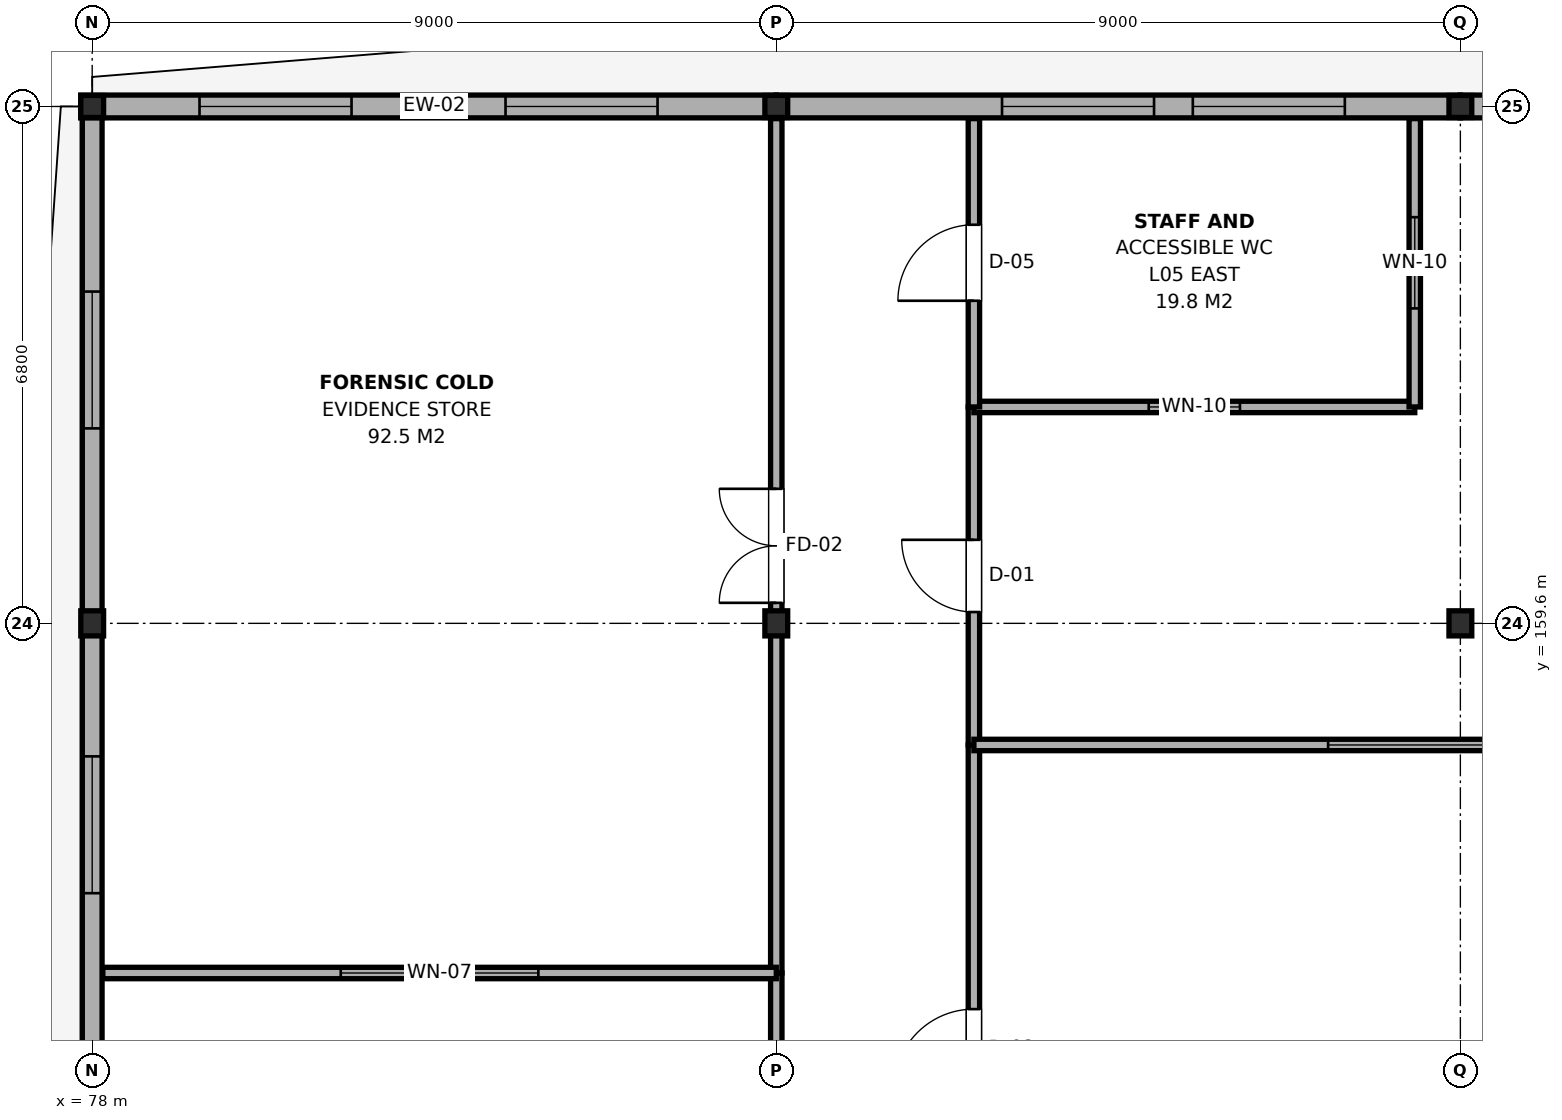
"""IFC4 building model, lengths in metres.
Left out: names, types, materials, properties, quantities, classifications, styles, units other than length and angle.
Written with IfcOpenShell. Run it as: python <this file> out.ifc"""

import sys

from ifc_helpers import new_model, si_unit, direction, frame, frame_2d, origin, origin_2d, place, context, subcontext, project, spatial, rectangle, i_section, extrude, element, fill, save


model = new_model("IFC4")
c1 = context("Model", 3, precision=1e-05, world=origin(), true_north=direction((0.0, 1.0)))
c2 = subcontext(c1, "Body", "Model", "MODEL_VIEW")
j1 = project(units=[si_unit("LENGTHUNIT", "METRE"), si_unit("PLANEANGLEUNIT", "RADIAN")], contexts=[c1])
p1 = place(None, origin())
s1 = spatial("IfcSite", under=j1, at=p1, CompositionType="ELEMENT")
p2 = place(p1, origin())
s2 = spatial("IfcBuilding", under=s1, at=p2, CompositionType="ELEMENT")
p3 = place(p2, frame((0.0, 0.0, 21.0)))
s3 = spatial("IfcBuildingStorey", under=s2, at=p3, CompositionType="ELEMENT", Elevation=21.0)
p4 = place(p3, frame((78.0, 159.6, 0.0), z_axis=(0.0, 0.0, 1.0), x_axis=(1.0, 0.0, 0.0)))
e1 = element("IfcColumn", 1, at=p4, inside=s3, PredefinedType="COLUMN", context=c2, shape_type="SweptSolid", body=[
    extrude(i_section(OverallWidth=0.3, OverallDepth=0.33, WebThickness=0.01, FlangeThickness=0.017, FilletRadius=0.027, at=origin_2d()), origin(), (0.0, 0.0, 1.0), 3.7),
])
p5 = place(p3, frame((78.0, 166.4, 0.0), z_axis=(0.0, 0.0, 1.0), x_axis=(1.0, 0.0, 0.0)))
e2 = element("IfcColumn", 2, at=p5, inside=s3, PredefinedType="COLUMN", context=c2, shape_type="SweptSolid", body=[
    extrude(i_section(OverallWidth=0.3, OverallDepth=0.29, WebThickness=0.009, FlangeThickness=0.014, FilletRadius=0.027, at=origin_2d()), origin(), (0.0, 0.0, 1.0), 3.7),
])
p6 = place(p3, frame((87.0, 159.6, 0.0), z_axis=(0.0, 0.0, 1.0), x_axis=(1.0, 0.0, 0.0)))
e3 = element("IfcColumn", 3, at=p6, inside=s3, PredefinedType="COLUMN", context=c2, shape_type="SweptSolid", body=[
    extrude(i_section(OverallWidth=0.3, OverallDepth=0.33, WebThickness=0.01, FlangeThickness=0.017, FilletRadius=0.027, at=origin_2d()), origin(), (0.0, 0.0, 1.0), 3.7),
])
p7 = place(p3, frame((87.0, 166.4, 0.0), z_axis=(0.0, 0.0, 1.0), x_axis=(1.0, 0.0, 0.0)))
e4 = element("IfcColumn", 4, at=p7, inside=s3, PredefinedType="COLUMN", context=c2, shape_type="SweptSolid", body=[
    extrude(i_section(OverallWidth=0.3, OverallDepth=0.29, WebThickness=0.009, FlangeThickness=0.014, FilletRadius=0.027, at=origin_2d()), origin(), (0.0, 0.0, 1.0), 3.7),
])
p8 = place(p3, frame((96.0, 159.6, 0.0), z_axis=(0.0, 0.0, 1.0), x_axis=(1.0, 0.0, 0.0)))
e5 = element("IfcColumn", 5, at=p8, inside=s3, PredefinedType="COLUMN", context=c2, shape_type="SweptSolid", body=[
    extrude(i_section(OverallWidth=0.3, OverallDepth=0.33, WebThickness=0.01, FlangeThickness=0.017, FilletRadius=0.027, at=origin_2d()), origin(), (0.0, 0.0, 1.0), 3.7),
])
p9 = place(p3, frame((96.0, 166.4, 0.0), z_axis=(0.0, 0.0, 1.0), x_axis=(1.0, 0.0, 0.0)))
e6 = element("IfcColumn", 6, at=p9, inside=s3, PredefinedType="COLUMN", context=c2, shape_type="SweptSolid", body=[
    extrude(i_section(OverallWidth=0.3, OverallDepth=0.29, WebThickness=0.009, FlangeThickness=0.014, FilletRadius=0.027, at=origin_2d()), origin(), (0.0, 0.0, 1.0), 3.7),
])
p10 = place(p3, frame((78.0, 152.4, 0.0), z_axis=(0.0, 0.0, 1.0), x_axis=(0.0, 1.0, 0.0)))
e7 = element("IfcWall", 7, at=p10, inside=s3, PredefinedType="SOLIDWALL", context=c2, shape_type="SweptSolid", body=[
    extrude(rectangle(XDim=7.2, YDim=0.26, at=frame_2d((3.6, 0.0))), origin(), (0.0, 0.0, 1.0), 3.095),
])
p11 = place(p10, frame((3.65, 0.0, 0.65)))
e8 = element("IfcOpeningElement", 8, at=p11, cuts=e7, PredefinedType="OPENING", context=c2, shape_type="SweptSolid", body=[
    extrude(rectangle(XDim=1.8, YDim=1.2, at=frame_2d((0.9, 0.6))), frame((0.0, 0.145, 0.0), z_axis=(0.0, -1.0, 0.0), x_axis=(1.0, 0.0, 0.0)), (0.0, 0.0, 1.0), 0.29),
])
p12 = place(p3, frame((78.0, 159.6, 0.0), z_axis=(0.0, 0.0, 1.0), x_axis=(0.0, 1.0, 0.0)))
e9 = element("IfcWall", 9, at=p12, inside=s3, PredefinedType="SOLIDWALL", context=c2, shape_type="SweptSolid", body=[
    extrude(rectangle(XDim=6.93, YDim=0.26, at=frame_2d((3.465, 0.0))), origin(), (0.0, 0.0, 1.0), 3.095),
])
p13 = place(p12, frame((2.565, 0.0, 0.65)))
e10 = element("IfcOpeningElement", 10, at=p13, cuts=e9, PredefinedType="OPENING", context=c2, shape_type="SweptSolid", body=[
    extrude(rectangle(XDim=1.8, YDim=1.2, at=frame_2d((0.9, 0.6))), frame((0.0, 0.145, 0.0), z_axis=(0.0, -1.0, 0.0), x_axis=(1.0, 0.0, 0.0)), (0.0, 0.0, 1.0), 0.29),
])
p14 = place(p3, frame((77.85, 166.4, 0.0), z_axis=(0.0, 0.0, 1.0), x_axis=(1.0, 0.0, 0.0)))
e11 = element("IfcWall", 11, at=p14, inside=s3, PredefinedType="SOLIDWALL", context=c2, shape_type="SweptSolid", body=[
    extrude(rectangle(XDim=9.15, YDim=0.3, at=frame_2d((4.575, 0.0))), origin(), (0.0, 0.0, 1.0), 3.155),
])
p15 = place(p14, frame((1.562, 0.0, 0.65)))
e12 = element("IfcOpeningElement", 12, at=p15, cuts=e11, PredefinedType="OPENING", context=c2, shape_type="SweptSolid", body=[
    extrude(rectangle(XDim=2.0, YDim=1.8, at=frame_2d((1.0, 0.9))), frame((0.0, 0.165, 0.0), z_axis=(0.0, -1.0, 0.0), x_axis=(1.0, 0.0, 0.0)), (0.0, 0.0, 1.0), 0.33),
])
p16 = place(p14, frame((5.588, 0.0, 0.65)))
e13 = element("IfcOpeningElement", 13, at=p16, cuts=e11, PredefinedType="OPENING", context=c2, shape_type="SweptSolid", body=[
    extrude(rectangle(XDim=2.0, YDim=1.8, at=frame_2d((1.0, 0.9))), frame((0.0, 0.165, 0.0), z_axis=(0.0, -1.0, 0.0), x_axis=(1.0, 0.0, 0.0)), (0.0, 0.0, 1.0), 0.33),
])
p17 = place(p3, frame((87.0, 166.4, 0.0), z_axis=(0.0, 0.0, 1.0), x_axis=(1.0, 0.0, 0.0)))
e14 = element("IfcWall", 14, at=p17, inside=s3, PredefinedType="SOLIDWALL", context=c2, shape_type="SweptSolid", body=[
    extrude(rectangle(XDim=9.0, YDim=0.3, at=frame_2d((4.5, 0.0))), origin(), (0.0, 0.0, 1.0), 3.155),
])
p18 = place(p17, frame((2.97, 0.0, 0.65)))
e15 = element("IfcOpeningElement", 15, at=p18, cuts=e14, PredefinedType="OPENING", context=c2, shape_type="SweptSolid", body=[
    extrude(rectangle(XDim=2.0, YDim=1.8, at=frame_2d((1.0, 0.9))), frame((0.0, 0.165, 0.0), z_axis=(0.0, -1.0, 0.0), x_axis=(1.0, 0.0, 0.0)), (0.0, 0.0, 1.0), 0.33),
])
p19 = place(p17, frame((5.48, 0.0, 0.65)))
e16 = element("IfcOpeningElement", 16, at=p19, cuts=e14, PredefinedType="OPENING", context=c2, shape_type="SweptSolid", body=[
    extrude(rectangle(XDim=2.0, YDim=1.8, at=frame_2d((1.0, 0.9))), frame((0.0, 0.165, 0.0), z_axis=(0.0, -1.0, 0.0), x_axis=(1.0, 0.0, 0.0)), (0.0, 0.0, 1.0), 0.33),
])
p20 = place(p3, frame((96.0, 166.4, 0.0), z_axis=(0.0, 0.0, 1.0), x_axis=(1.0, 0.0, 0.0)))
e17 = element("IfcWall", 17, at=p20, inside=s3, PredefinedType="SOLIDWALL", context=c2, shape_type="SweptSolid", body=[
    extrude(rectangle(XDim=9.0, YDim=0.3, at=frame_2d((4.5, 0.0))), origin(), (0.0, 0.0, 1.0), 3.205),
])
p21 = place(p3, frame((87.0, 144.2, 0.0), z_axis=(0.0, 0.0, 1.0), x_axis=(0.0, 1.0, 0.0)))
e18 = element("IfcWall", 18, at=p21, inside=s3, PredefinedType="PARTITIONING", context=c2, shape_type="SweptSolid", body=[
    extrude(rectangle(XDim=10.8, YDim=0.15, at=frame_2d((5.4, 0.0))), origin(), (0.0, 0.0, 1.0), 3.105),
])
p22 = place(p21, frame((4.875, 0.0, 0.0)))
e19 = element("IfcOpeningElement", 19, at=p22, cuts=e18, PredefinedType="OPENING", context=c2, shape_type="SweptSolid", body=[
    extrude(rectangle(XDim=1.05, YDim=2.15, at=frame_2d((0.525, 1.075))), frame((0.0, 0.09, 0.0), z_axis=(0.0, -1.0, 0.0), x_axis=(1.0, 0.0, 0.0)), (0.0, 0.0, 1.0), 0.18),
])
p23 = place(p3, frame((87.0, 155.0, 0.0), z_axis=(0.0, 0.0, 1.0), x_axis=(0.0, 1.0, 0.0)))
e20 = element("IfcWall", 20, at=p23, inside=s3, PredefinedType="PARTITIONING", context=c2, shape_type="SweptSolid", body=[
    extrude(rectangle(XDim=11.24, YDim=0.15, at=frame_2d((5.62, 0.0))), origin(), (0.0, 0.0, 1.0), 3.095),
])
p24 = place(p23, frame((4.87, 0.0, 0.0)))
e21 = element("IfcOpeningElement", 21, at=p24, cuts=e20, PredefinedType="OPENING", context=c2, shape_type="SweptSolid", body=[
    extrude(rectangle(XDim=1.5, YDim=2.15, at=frame_2d((0.75, 1.075))), frame((0.0, 0.09, 0.0), z_axis=(0.0, -1.0, 0.0), x_axis=(1.0, 0.0, 0.0)), (0.0, 0.0, 1.0), 0.18),
])
p25 = place(p3, frame((78.14, 155.0, 0.0), z_axis=(0.0, 0.0, 1.0), x_axis=(1.0, 0.0, 0.0)))
e22 = element("IfcWall", 22, at=p25, inside=s3, PredefinedType="PARTITIONING", context=c2, shape_type="SweptSolid", body=[
    extrude(rectangle(XDim=8.86, YDim=0.15, at=frame_2d((4.43, 0.0))), origin(), (0.0, 0.0, 1.0), 3.365),
])
p26 = place(p25, frame((3.13, 0.0, 0.95)))
e23 = element("IfcOpeningElement", 23, at=p26, cuts=e22, PredefinedType="OPENING", context=c2, shape_type="SweptSolid", body=[
    extrude(rectangle(XDim=2.6, YDim=1.5, at=frame_2d((1.3, 0.75))), frame((0.0, 0.09, 0.0), z_axis=(0.0, -1.0, 0.0), x_axis=(1.0, 0.0, 0.0)), (0.0, 0.0, 1.0), 0.18),
])
p27 = place(p3, frame((89.6, 150.0, 0.0), z_axis=(0.0, 0.0, 1.0), x_axis=(0.0, 1.0, 0.0)))
e24 = element("IfcWall", 24, at=p27, inside=s3, PredefinedType="PARTITIONING", context=c2, shape_type="SweptSolid", body=[
    extrude(rectangle(XDim=8.0, YDim=0.15, at=frame_2d((4.0, 0.0))), origin(), (0.0, 0.0, 1.0), 3.105),
])
p28 = place(p27, frame((3.475, 0.0, 0.0)))
e25 = element("IfcOpeningElement", 25, at=p28, cuts=e24, PredefinedType="OPENING", context=c2, shape_type="SweptSolid", body=[
    extrude(rectangle(XDim=1.05, YDim=2.15, at=frame_2d((0.525, 1.075))), frame((0.0, 0.09, 0.0), z_axis=(0.0, -1.0, 0.0), x_axis=(1.0, 0.0, 0.0)), (0.0, 0.0, 1.0), 0.18),
])
p29 = place(p3, frame((89.6, 158.0, 0.0), z_axis=(0.0, 0.0, 1.0), x_axis=(0.0, 1.0, 0.0)))
e26 = element("IfcWall", 26, at=p29, inside=s3, PredefinedType="PARTITIONING", context=c2, shape_type="SweptSolid", body=[
    extrude(rectangle(XDim=4.447, YDim=0.15, at=frame_2d((2.224, 0.0))), origin(), (0.0, 0.0, 1.0), 3.305),
])
p30 = place(p29, frame((1.749, 0.0, 0.0)))
e27 = element("IfcOpeningElement", 27, at=p30, cuts=e26, PredefinedType="OPENING", context=c2, shape_type="SweptSolid", body=[
    extrude(rectangle(XDim=0.95, YDim=2.15, at=frame_2d((0.475, 1.075))), frame((0.0, 0.09, 0.0), z_axis=(0.0, -1.0, 0.0), x_axis=(1.0, 0.0, 0.0)), (0.0, 0.0, 1.0), 0.18),
])
p31 = place(p3, frame((89.6, 162.447, 0.0), z_axis=(0.0, 0.0, 1.0), x_axis=(1.0, 0.0, 0.0)))
e28 = element("IfcWall", 28, at=p31, inside=s3, PredefinedType="PARTITIONING", context=c2, shape_type="SweptSolid", body=[
    extrude(rectangle(XDim=5.8, YDim=0.15, at=frame_2d((2.9, 0.0))), origin(), (0.0, 0.0, 1.0), 3.695),
])
p32 = place(p31, frame((2.3, 0.0, 0.95)))
e29 = element("IfcOpeningElement", 29, at=p32, cuts=e28, PredefinedType="OPENING", context=c2, shape_type="SweptSolid", body=[
    extrude(rectangle(XDim=1.2, YDim=1.5, at=frame_2d((0.6, 0.75))), frame((0.0, 0.09, 0.0), z_axis=(0.0, -1.0, 0.0), x_axis=(1.0, 0.0, 0.0)), (0.0, 0.0, 1.0), 0.18),
])
p33 = place(p3, frame((95.4, 162.447, 0.0), z_axis=(0.0, 0.0, 1.0), x_axis=(0.0, 1.0, 0.0)))
e30 = element("IfcWall", 30, at=p33, inside=s3, PredefinedType="PARTITIONING", context=c2, shape_type="SweptSolid", body=[
    extrude(rectangle(XDim=3.793, YDim=0.15, at=frame_2d((1.896, 0.0))), origin(), (0.0, 0.0, 1.0), 3.205),
])
p34 = place(p33, frame((1.296, 0.0, 0.95)))
e31 = element("IfcOpeningElement", 31, at=p34, cuts=e30, PredefinedType="OPENING", context=c2, shape_type="SweptSolid", body=[
    extrude(rectangle(XDim=1.2, YDim=1.5, at=frame_2d((0.6, 0.75))), frame((0.0, 0.09, 0.0), z_axis=(0.0, -1.0, 0.0), x_axis=(1.0, 0.0, 0.0)), (0.0, 0.0, 1.0), 0.18),
])
p35 = place(p3, frame((89.6, 162.447, 0.0), z_axis=(0.0, 0.0, 1.0), x_axis=(0.0, 1.0, 0.0)))
e32 = element("IfcWall", 32, at=p35, inside=s3, PredefinedType="PARTITIONING", context=c2, shape_type="SweptSolid", body=[
    extrude(rectangle(XDim=3.793, YDim=0.15, at=frame_2d((1.896, 0.0))), origin(), (0.0, 0.0, 1.0), 3.205),
])
p36 = place(p35, frame((1.397, 0.0, 0.0)))
e33 = element("IfcOpeningElement", 33, at=p36, cuts=e32, PredefinedType="OPENING", context=c2, shape_type="SweptSolid", body=[
    extrude(rectangle(XDim=1.0, YDim=2.15, at=frame_2d((0.5, 1.075))), frame((0.0, 0.09, 0.0), z_axis=(0.0, -1.0, 0.0), x_axis=(1.0, 0.0, 0.0)), (0.0, 0.0, 1.0), 0.18),
])
p37 = place(p3, frame((89.6, 158.0, 0.0), z_axis=(0.0, 0.0, 1.0), x_axis=(1.0, 0.0, 0.0)))
e34 = element("IfcWall", 34, at=p37, inside=s3, PredefinedType="PARTITIONING", context=c2, shape_type="SweptSolid", body=[
    extrude(rectangle(XDim=23.84, YDim=0.15, at=frame_2d((11.92, 0.0))), origin(), (0.0, 0.0, 1.0), 3.365),
])
p38 = place(p37, frame((4.66, 0.0, 0.95)))
e35 = element("IfcOpeningElement", 35, at=p38, cuts=e34, PredefinedType="OPENING", context=c2, shape_type="SweptSolid", body=[
    extrude(rectangle(XDim=2.6, YDim=1.5, at=frame_2d((1.3, 0.75))), frame((0.0, 0.09, 0.0), z_axis=(0.0, -1.0, 0.0), x_axis=(1.0, 0.0, 0.0)), (0.0, 0.0, 1.0), 0.18),
])
p39 = place(p37, frame((16.58, 0.0, 0.95)))
e36 = element("IfcOpeningElement", 36, at=p39, cuts=e34, PredefinedType="OPENING", context=c2, shape_type="SweptSolid", body=[
    extrude(rectangle(XDim=2.6, YDim=1.5, at=frame_2d((1.3, 0.75))), frame((0.0, 0.09, 0.0), z_axis=(0.0, -1.0, 0.0), x_axis=(1.0, 0.0, 0.0)), (0.0, 0.0, 1.0), 0.18),
])
p40 = place(p11, origin())
e37 = element("IfcWindow", 37, at=p40, inside=s3, PartitioningType="SINGLE_PANEL", PredefinedType="WINDOW", context=c2, shape_type="SweptSolid", body=[
    extrude(rectangle(XDim=1.8, YDim=1.2, at=frame_2d((0.9, 0.6))), frame((0.0, 0.03, 0.0), z_axis=(0.0, -1.0, 0.0), x_axis=(1.0, 0.0, 0.0)), (0.0, 0.0, 1.0), 0.06),
])
fill(e8, e37)
p41 = place(p13, origin())
e38 = element("IfcWindow", 38, at=p41, inside=s3, PartitioningType="SINGLE_PANEL", PredefinedType="WINDOW", context=c2, shape_type="SweptSolid", body=[
    extrude(rectangle(XDim=1.8, YDim=1.2, at=frame_2d((0.9, 0.6))), frame((0.0, 0.03, 0.0), z_axis=(0.0, -1.0, 0.0), x_axis=(1.0, 0.0, 0.0)), (0.0, 0.0, 1.0), 0.06),
])
fill(e10, e38)
p42 = place(p15, origin())
e39 = element("IfcWindow", 39, at=p42, inside=s3, PartitioningType="SINGLE_PANEL", PredefinedType="WINDOW", context=c2, shape_type="SweptSolid", body=[
    extrude(rectangle(XDim=2.0, YDim=1.8, at=frame_2d((1.0, 0.9))), frame((0.0, 0.03, 0.0), z_axis=(0.0, -1.0, 0.0), x_axis=(1.0, 0.0, 0.0)), (0.0, 0.0, 1.0), 0.06),
])
fill(e12, e39)
p43 = place(p16, origin())
e40 = element("IfcWindow", 40, at=p43, inside=s3, PartitioningType="SINGLE_PANEL", PredefinedType="WINDOW", context=c2, shape_type="SweptSolid", body=[
    extrude(rectangle(XDim=2.0, YDim=1.8, at=frame_2d((1.0, 0.9))), frame((0.0, 0.03, 0.0), z_axis=(0.0, -1.0, 0.0), x_axis=(1.0, 0.0, 0.0)), (0.0, 0.0, 1.0), 0.06),
])
fill(e13, e40)
p44 = place(p18, origin())
e41 = element("IfcWindow", 41, at=p44, inside=s3, PartitioningType="SINGLE_PANEL", PredefinedType="WINDOW", context=c2, shape_type="SweptSolid", body=[
    extrude(rectangle(XDim=2.0, YDim=1.8, at=frame_2d((1.0, 0.9))), frame((0.0, 0.03, 0.0), z_axis=(0.0, -1.0, 0.0), x_axis=(1.0, 0.0, 0.0)), (0.0, 0.0, 1.0), 0.06),
])
fill(e15, e41)
p45 = place(p19, origin())
e42 = element("IfcWindow", 42, at=p45, inside=s3, PartitioningType="SINGLE_PANEL", PredefinedType="WINDOW", context=c2, shape_type="SweptSolid", body=[
    extrude(rectangle(XDim=2.0, YDim=1.8, at=frame_2d((1.0, 0.9))), frame((0.0, 0.03, 0.0), z_axis=(0.0, -1.0, 0.0), x_axis=(1.0, 0.0, 0.0)), (0.0, 0.0, 1.0), 0.06),
])
fill(e16, e42)
p46 = place(p24, origin())
e43 = element("IfcDoor", 43, at=p46, inside=s3, OperationType="DOUBLE_DOOR_SINGLE_SWING", PredefinedType="DOOR", context=c2, shape_type="SweptSolid", body=[
    extrude(rectangle(XDim=1.5, YDim=2.15, at=frame_2d((0.75, 1.075))), frame((0.0, 0.025, 0.0), z_axis=(0.0, -1.0, 0.0), x_axis=(1.0, 0.0, 0.0)), (0.0, 0.0, 1.0), 0.05),
])
fill(e21, e43)
p47 = place(p26, origin())
e44 = element("IfcWindow", 44, at=p47, inside=s3, PartitioningType="SINGLE_PANEL", PredefinedType="WINDOW", context=c2, shape_type="SweptSolid", body=[
    extrude(rectangle(XDim=2.6, YDim=1.5, at=frame_2d((1.3, 0.75))), frame((0.0, 0.03, 0.0), z_axis=(0.0, -1.0, 0.0), x_axis=(1.0, 0.0, 0.0)), (0.0, 0.0, 1.0), 0.06),
])
fill(e23, e44)
p48 = place(p28, origin())
e45 = element("IfcDoor", 45, at=p48, inside=s3, OperationType="SINGLE_SWING_LEFT", PredefinedType="DOOR", context=c2, shape_type="SweptSolid", body=[
    extrude(rectangle(XDim=1.05, YDim=2.15, at=frame_2d((0.525, 1.075))), frame((0.0, 0.025, 0.0), z_axis=(0.0, -1.0, 0.0), x_axis=(1.0, 0.0, 0.0)), (0.0, 0.0, 1.0), 0.05),
])
fill(e25, e45)
p49 = place(p30, origin())
e46 = element("IfcDoor", 46, at=p49, inside=s3, OperationType="SINGLE_SWING_RIGHT", PredefinedType="DOOR", context=c2, shape_type="SweptSolid", body=[
    extrude(rectangle(XDim=0.95, YDim=2.15, at=frame_2d((0.475, 1.075))), frame((0.0, 0.025, 0.0), z_axis=(0.0, -1.0, 0.0), x_axis=(1.0, 0.0, 0.0)), (0.0, 0.0, 1.0), 0.05),
])
fill(e27, e46)
p50 = place(p32, origin())
e47 = element("IfcWindow", 47, at=p50, inside=s3, PartitioningType="SINGLE_PANEL", PredefinedType="WINDOW", context=c2, shape_type="SweptSolid", body=[
    extrude(rectangle(XDim=1.2, YDim=1.5, at=frame_2d((0.6, 0.75))), frame((0.0, 0.03, 0.0), z_axis=(0.0, -1.0, 0.0), x_axis=(1.0, 0.0, 0.0)), (0.0, 0.0, 1.0), 0.06),
])
fill(e29, e47)
p51 = place(p34, origin())
e48 = element("IfcWindow", 48, at=p51, inside=s3, PartitioningType="SINGLE_PANEL", PredefinedType="WINDOW", context=c2, shape_type="SweptSolid", body=[
    extrude(rectangle(XDim=1.2, YDim=1.5, at=frame_2d((0.6, 0.75))), frame((0.0, 0.03, 0.0), z_axis=(0.0, -1.0, 0.0), x_axis=(1.0, 0.0, 0.0)), (0.0, 0.0, 1.0), 0.06),
])
fill(e31, e48)
p52 = place(p36, origin())
e49 = element("IfcDoor", 49, at=p52, inside=s3, OperationType="SINGLE_SWING_LEFT", PredefinedType="DOOR", context=c2, shape_type="SweptSolid", body=[
    extrude(rectangle(XDim=1.0, YDim=2.15, at=frame_2d((0.5, 1.075))), frame((0.0, 0.025, 0.0), z_axis=(0.0, -1.0, 0.0), x_axis=(1.0, 0.0, 0.0)), (0.0, 0.0, 1.0), 0.05),
])
fill(e33, e49)
p53 = place(p38, origin())
e50 = element("IfcWindow", 50, at=p53, inside=s3, PartitioningType="SINGLE_PANEL", PredefinedType="WINDOW", context=c2, shape_type="SweptSolid", body=[
    extrude(rectangle(XDim=2.6, YDim=1.5, at=frame_2d((1.3, 0.75))), frame((0.0, 0.03, 0.0), z_axis=(0.0, -1.0, 0.0), x_axis=(1.0, 0.0, 0.0)), (0.0, 0.0, 1.0), 0.06),
])
fill(e35, e50)
save(model, sys.argv[1])
